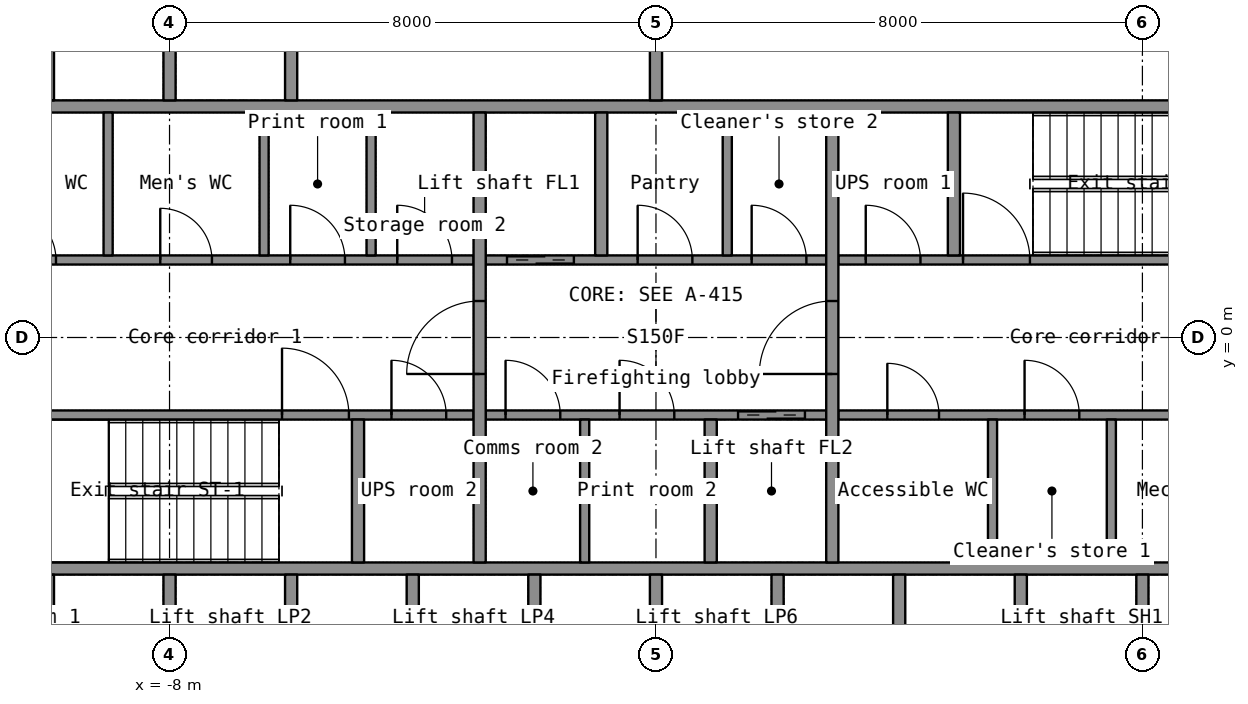
"""IFC4 building model, lengths in metres.
Left out: names, types, materials, properties, quantities, classifications, styles, units other than length and angle.
Written with IfcOpenShell. Run it as: python <this file> out.ifc"""

import sys

from ifc_helpers import new_model, si_unit, direction, frame, frame_2d, origin, place, context, subcontext, project, spatial, rectangle, extrude, element, fill, save


model = new_model("IFC4")
c1 = context("Model", 3, precision=1e-05, world=origin(), true_north=direction((0.0, 1.0)))
c2 = subcontext(c1, "Body", "Model", "MODEL_VIEW")
j1 = project(units=[si_unit("LENGTHUNIT", "METRE"), si_unit("PLANEANGLEUNIT", "RADIAN")], contexts=[c1])
p1 = place(None, origin())
s1 = spatial("IfcSite", under=j1, at=p1, CompositionType="ELEMENT")
p2 = place(p1, origin())
s2 = spatial("IfcBuilding", under=s1, at=p2, CompositionType="ELEMENT")
p3 = place(p2, frame((0.0, 0.0, 97.1)))
s3 = spatial("IfcBuildingStorey", under=s2, at=p3, CompositionType="ELEMENT", Elevation=97.1)
for number, where, z_axis, x_axis in (
    (1, (-11.5, -3.8, 0.0), (0.0, 0.0, 1.0), (1.0, 0.0, 0.0)),
    (2, (-11.5, 3.8, 0.0), (0.0, 0.0, 1.0), (1.0, 0.0, 0.0)),
):
    element("IfcWall", number, at=place(p3, frame(where, z_axis=z_axis, x_axis=x_axis)), inside=s3, PredefinedType="SHEAR", context=c2, shape_type="SweptSolid", body=[
        extrude(rectangle(XDim=23.0, YDim=0.2, at=frame_2d((11.5, 0.0))), origin(), (0.0, 0.0, 1.0), 3.3),
    ])
for number, where, z_axis, x_axis in (
    (3, (-10.0, -6.7, 0.0), (0.0, 0.0, 1.0), (0.0, 1.0, 0.0)),
    (4, (-8.0, -6.7, 0.0), (0.0, 0.0, 1.0), (0.0, 1.0, 0.0)),
    (5, (-6.0, -6.7, 0.0), (0.0, 0.0, 1.0), (0.0, 1.0, 0.0)),
    (6, (-4.0, -6.7, 0.0), (0.0, 0.0, 1.0), (0.0, 1.0, 0.0)),
    (7, (-2.0, -6.7, 0.0), (0.0, 0.0, 1.0), (0.0, 1.0, 0.0)),
    (8, (0.0, -6.7, 0.0), (0.0, 0.0, 1.0), (0.0, 1.0, 0.0)),
    (9, (2.0, -6.7, 0.0), (0.0, 0.0, 1.0), (0.0, 1.0, 0.0)),
    (10, (4.0, -6.7, 0.0), (0.0, 0.0, 1.0), (0.0, 1.0, 0.0)),
    (11, (6.0, -6.7, 0.0), (0.0, 0.0, 1.0), (0.0, 1.0, 0.0)),
    (12, (8.0, -6.7, 0.0), (0.0, 0.0, 1.0), (0.0, 1.0, 0.0)),
    (13, (-10.0, 3.9, 0.0), (0.0, 0.0, 1.0), (0.0, 1.0, 0.0)),
    (14, (-8.0, 3.9, 0.0), (0.0, 0.0, 1.0), (0.0, 1.0, 0.0)),
    (15, (-6.0, 3.9, 0.0), (0.0, 0.0, 1.0), (0.0, 1.0, 0.0)),
):
    element("IfcWall", number, at=place(p3, frame(where, z_axis=z_axis, x_axis=x_axis)), inside=s3, PredefinedType="SHEAR", context=c2, shape_type="SweptSolid", body=[
        extrude(rectangle(XDim=2.8, YDim=0.2, at=frame_2d((1.4, 0.0))), origin(), (0.0, 0.0, 1.0), 3.3),
    ])
p4 = place(p3, frame((0.0, 3.9, 0.0), z_axis=(0.0, 0.0, 1.0), x_axis=(0.0, 1.0, 0.0)))
e16 = element("IfcWall", 16, at=p4, inside=s3, PredefinedType="PARTITIONING", context=c2, shape_type="SweptSolid", body=[
    extrude(rectangle(XDim=2.8, YDim=0.2, at=frame_2d((1.4, 0.0))), origin(), (0.0, 0.0, 1.0), 3.3),
])
p5 = place(p3, frame((-11.5, -1.275, 0.0), z_axis=(0.0, 0.0, 1.0), x_axis=(1.0, 0.0, 0.0)))
e17 = element("IfcWall", 17, at=p5, inside=s3, PredefinedType="SHEAR", context=c2, shape_type="SweptSolid", body=[
    extrude(rectangle(XDim=8.5, YDim=0.15, at=frame_2d((4.25, 0.0))), origin(), (0.0, 0.0, 1.0), 3.3),
])
p6 = place(p5, frame((5.35, 0.0, 0.0)))
e18 = element("IfcOpeningElement", 18, at=p6, cuts=e17, PredefinedType="OPENING", context=c2, shape_type="SweptSolid", body=[
    extrude(rectangle(XDim=1.1, YDim=2.15, at=frame_2d((0.55, 1.075))), frame((0.0, 0.085, 0.0), z_axis=(0.0, -1.0, 0.0), x_axis=(1.0, 0.0, 0.0)), (0.0, 0.0, 1.0), 0.17),
])
p7 = place(p5, frame((7.15, 0.0, 0.0)))
e19 = element("IfcOpeningElement", 19, at=p7, cuts=e17, PredefinedType="OPENING", context=c2, shape_type="SweptSolid", body=[
    extrude(rectangle(XDim=0.9, YDim=2.1, at=frame_2d((0.45, 1.05))), frame((0.0, 0.085, 0.0), z_axis=(0.0, -1.0, 0.0), x_axis=(1.0, 0.0, 0.0)), (0.0, 0.0, 1.0), 0.17),
])
p8 = place(p3, frame((-2.8, -1.275, 0.0), z_axis=(0.0, 0.0, 1.0), x_axis=(1.0, 0.0, 0.0)))
e20 = element("IfcWall", 20, at=p8, inside=s3, PredefinedType="SHEAR", context=c2, shape_type="SweptSolid", body=[
    extrude(rectangle(XDim=5.6, YDim=0.15, at=frame_2d((2.8, 0.0))), origin(), (0.0, 0.0, 1.0), 3.3),
])
p9 = place(p8, frame((4.15, 0.0, 0.0)))
e21 = element("IfcOpeningElement", 21, at=p9, cuts=e20, PredefinedType="OPENING", context=c2, shape_type="SweptSolid", body=[
    extrude(rectangle(XDim=1.1, YDim=2.2, at=frame_2d((0.55, 1.1))), frame((0.0, 0.085, 0.0), z_axis=(0.0, -1.0, 0.0), x_axis=(1.0, 0.0, 0.0)), (0.0, 0.0, 1.0), 0.17),
])
p10 = place(p8, frame((0.326, 0.0, 0.0)))
e22 = element("IfcOpeningElement", 22, at=p10, cuts=e20, PredefinedType="OPENING", context=c2, shape_type="SweptSolid", body=[
    extrude(rectangle(XDim=0.9, YDim=2.1, at=frame_2d((0.45, 1.05))), frame((0.0, 0.085, 0.0), z_axis=(0.0, -1.0, 0.0), x_axis=(1.0, 0.0, 0.0)), (0.0, 0.0, 1.0), 0.17),
])
p11 = place(p8, frame((2.201, 0.0, 0.0)))
e23 = element("IfcOpeningElement", 23, at=p11, cuts=e20, PredefinedType="OPENING", context=c2, shape_type="SweptSolid", body=[
    extrude(rectangle(XDim=0.9, YDim=2.1, at=frame_2d((0.45, 1.05))), frame((0.0, 0.085, 0.0), z_axis=(0.0, -1.0, 0.0), x_axis=(1.0, 0.0, 0.0)), (0.0, 0.0, 1.0), 0.17),
])
p12 = place(p3, frame((3.0, -1.275, 0.0), z_axis=(0.0, 0.0, 1.0), x_axis=(1.0, 0.0, 0.0)))
e24 = element("IfcWall", 24, at=p12, inside=s3, PredefinedType="PARTITIONING", context=c2, shape_type="SweptSolid", body=[
    extrude(rectangle(XDim=8.5, YDim=0.15, at=frame_2d((4.25, 0.0))), origin(), (0.0, 0.0, 1.0), 3.3),
])
p13 = place(p12, frame((0.805, 0.0, 0.0)))
e25 = element("IfcOpeningElement", 25, at=p13, cuts=e24, PredefinedType="OPENING", context=c2, shape_type="SweptSolid", body=[
    extrude(rectangle(XDim=0.85, YDim=2.1, at=frame_2d((0.425, 1.05))), frame((0.0, 0.085, 0.0), z_axis=(0.0, -1.0, 0.0), x_axis=(1.0, 0.0, 0.0)), (0.0, 0.0, 1.0), 0.17),
])
p14 = place(p12, frame((3.062, 0.0, 0.0)))
e26 = element("IfcOpeningElement", 26, at=p14, cuts=e24, PredefinedType="OPENING", context=c2, shape_type="SweptSolid", body=[
    extrude(rectangle(XDim=0.9, YDim=2.1, at=frame_2d((0.45, 1.05))), frame((0.0, 0.085, 0.0), z_axis=(0.0, -1.0, 0.0), x_axis=(1.0, 0.0, 0.0)), (0.0, 0.0, 1.0), 0.17),
])
p15 = place(p12, frame((6.082, 0.0, 0.0)))
e27 = element("IfcOpeningElement", 27, at=p15, cuts=e24, PredefinedType="OPENING", context=c2, shape_type="SweptSolid", body=[
    extrude(rectangle(XDim=0.9, YDim=2.1, at=frame_2d((0.45, 1.05))), frame((0.0, 0.085, 0.0), z_axis=(0.0, -1.0, 0.0), x_axis=(1.0, 0.0, 0.0)), (0.0, 0.0, 1.0), 0.17),
])
p16 = place(p3, frame((-11.5, 1.275, 0.0), z_axis=(0.0, 0.0, 1.0), x_axis=(1.0, 0.0, 0.0)))
e28 = element("IfcWall", 28, at=p16, inside=s3, PredefinedType="PARTITIONING", context=c2, shape_type="SweptSolid", body=[
    extrude(rectangle(XDim=8.5, YDim=0.15, at=frame_2d((4.25, 0.0))), origin(), (0.0, 0.0, 1.0), 3.3),
])
p17 = place(p16, frame((0.782, 0.0, 0.0)))
e29 = element("IfcOpeningElement", 29, at=p17, cuts=e28, PredefinedType="OPENING", context=c2, shape_type="SweptSolid", body=[
    extrude(rectangle(XDim=0.85, YDim=2.1, at=frame_2d((0.425, 1.05))), frame((0.0, 0.085, 0.0), z_axis=(0.0, -1.0, 0.0), x_axis=(1.0, 0.0, 0.0)), (0.0, 0.0, 1.0), 0.17),
])
p18 = place(p16, frame((3.347, 0.0, 0.0)))
e30 = element("IfcOpeningElement", 30, at=p18, cuts=e28, PredefinedType="OPENING", context=c2, shape_type="SweptSolid", body=[
    extrude(rectangle(XDim=0.85, YDim=2.1, at=frame_2d((0.425, 1.05))), frame((0.0, 0.085, 0.0), z_axis=(0.0, -1.0, 0.0), x_axis=(1.0, 0.0, 0.0)), (0.0, 0.0, 1.0), 0.17),
])
p19 = place(p16, frame((5.485, 0.0, 0.0)))
e31 = element("IfcOpeningElement", 31, at=p19, cuts=e28, PredefinedType="OPENING", context=c2, shape_type="SweptSolid", body=[
    extrude(rectangle(XDim=0.9, YDim=2.1, at=frame_2d((0.45, 1.05))), frame((0.0, 0.085, 0.0), z_axis=(0.0, -1.0, 0.0), x_axis=(1.0, 0.0, 0.0)), (0.0, 0.0, 1.0), 0.17),
])
p20 = place(p16, frame((7.245, 0.0, 0.0)))
e32 = element("IfcOpeningElement", 32, at=p20, cuts=e28, PredefinedType="OPENING", context=c2, shape_type="SweptSolid", body=[
    extrude(rectangle(XDim=0.9, YDim=2.1, at=frame_2d((0.45, 1.05))), frame((0.0, 0.085, 0.0), z_axis=(0.0, -1.0, 0.0), x_axis=(1.0, 0.0, 0.0)), (0.0, 0.0, 1.0), 0.17),
])
p21 = place(p3, frame((-2.8, 1.275, 0.0), z_axis=(0.0, 0.0, 1.0), x_axis=(1.0, 0.0, 0.0)))
e33 = element("IfcWall", 33, at=p21, inside=s3, PredefinedType="SHEAR", context=c2, shape_type="SweptSolid", body=[
    extrude(rectangle(XDim=5.6, YDim=0.15, at=frame_2d((2.8, 0.0))), origin(), (0.0, 0.0, 1.0), 3.3),
])
p22 = place(p21, frame((0.35, 0.0, 0.0)))
e34 = element("IfcOpeningElement", 34, at=p22, cuts=e33, PredefinedType="OPENING", context=c2, shape_type="SweptSolid", body=[
    extrude(rectangle(XDim=1.1, YDim=2.2, at=frame_2d((0.55, 1.1))), frame((0.0, 0.085, 0.0), z_axis=(0.0, -1.0, 0.0), x_axis=(1.0, 0.0, 0.0)), (0.0, 0.0, 1.0), 0.17),
])
p23 = place(p21, frame((2.499, 0.0, 0.0)))
e35 = element("IfcOpeningElement", 35, at=p23, cuts=e33, PredefinedType="OPENING", context=c2, shape_type="SweptSolid", body=[
    extrude(rectangle(XDim=0.9, YDim=2.1, at=frame_2d((0.45, 1.05))), frame((0.0, 0.085, 0.0), z_axis=(0.0, -1.0, 0.0), x_axis=(1.0, 0.0, 0.0)), (0.0, 0.0, 1.0), 0.17),
])
p24 = place(p21, frame((4.374, 0.0, 0.0)))
e36 = element("IfcOpeningElement", 36, at=p24, cuts=e33, PredefinedType="OPENING", context=c2, shape_type="SweptSolid", body=[
    extrude(rectangle(XDim=0.9, YDim=2.1, at=frame_2d((0.45, 1.05))), frame((0.0, 0.085, 0.0), z_axis=(0.0, -1.0, 0.0), x_axis=(1.0, 0.0, 0.0)), (0.0, 0.0, 1.0), 0.17),
])
p25 = place(p3, frame((3.0, 1.275, 0.0), z_axis=(0.0, 0.0, 1.0), x_axis=(1.0, 0.0, 0.0)))
e37 = element("IfcWall", 37, at=p25, inside=s3, PredefinedType="SHEAR", context=c2, shape_type="SweptSolid", body=[
    extrude(rectangle(XDim=8.5, YDim=0.15, at=frame_2d((4.25, 0.0))), origin(), (0.0, 0.0, 1.0), 3.3),
])
p26 = place(p25, frame((2.05, 0.0, 0.0)))
e38 = element("IfcOpeningElement", 38, at=p26, cuts=e37, PredefinedType="OPENING", context=c2, shape_type="SweptSolid", body=[
    extrude(rectangle(XDim=1.1, YDim=2.15, at=frame_2d((0.55, 1.075))), frame((0.0, 0.085, 0.0), z_axis=(0.0, -1.0, 0.0), x_axis=(1.0, 0.0, 0.0)), (0.0, 0.0, 1.0), 0.17),
])
p27 = place(p25, frame((0.45, 0.0, 0.0)))
e39 = element("IfcOpeningElement", 39, at=p27, cuts=e37, PredefinedType="OPENING", context=c2, shape_type="SweptSolid", body=[
    extrude(rectangle(XDim=0.9, YDim=2.1, at=frame_2d((0.45, 1.05))), frame((0.0, 0.085, 0.0), z_axis=(0.0, -1.0, 0.0), x_axis=(1.0, 0.0, 0.0)), (0.0, 0.0, 1.0), 0.17),
])
p28 = place(p3, frame((-2.9, -3.7, 0.0), z_axis=(0.0, 0.0, 1.0), x_axis=(0.0, 1.0, 0.0)))
e40 = element("IfcWall", 40, at=p28, inside=s3, PredefinedType="SHEAR", context=c2, shape_type="SweptSolid", body=[
    extrude(rectangle(XDim=7.4, YDim=0.2, at=frame_2d((3.7, 0.0))), origin(), (0.0, 0.0, 1.0), 3.3),
])
p29 = place(p28, frame((3.1, 0.0, 0.0)))
e41 = element("IfcOpeningElement", 41, at=p29, cuts=e40, PredefinedType="OPENING", context=c2, shape_type="SweptSolid", body=[
    extrude(rectangle(XDim=1.2, YDim=2.2, at=frame_2d((0.6, 1.1))), frame((0.0, 0.11, 0.0), z_axis=(0.0, -1.0, 0.0), x_axis=(1.0, 0.0, 0.0)), (0.0, 0.0, 1.0), 0.22),
])
p30 = place(p3, frame((2.9, -3.7, 0.0), z_axis=(0.0, 0.0, 1.0), x_axis=(0.0, 1.0, 0.0)))
e42 = element("IfcWall", 42, at=p30, inside=s3, PredefinedType="SHEAR", context=c2, shape_type="SweptSolid", body=[
    extrude(rectangle(XDim=7.4, YDim=0.2, at=frame_2d((3.7, 0.0))), origin(), (0.0, 0.0, 1.0), 3.3),
])
p31 = place(p30, frame((3.1, 0.0, 0.0)))
e43 = element("IfcOpeningElement", 43, at=p31, cuts=e42, PredefinedType="OPENING", context=c2, shape_type="SweptSolid", body=[
    extrude(rectangle(XDim=1.2, YDim=2.2, at=frame_2d((0.6, 1.1))), frame((0.0, 0.11, 0.0), z_axis=(0.0, -1.0, 0.0), x_axis=(1.0, 0.0, 0.0)), (0.0, 0.0, 1.0), 0.22),
])
for number, where, z_axis, x_axis in (
    (44, (-0.9, 1.35, 0.0), (0.0, 0.0, 1.0), (0.0, 1.0, 0.0)),
    (45, (0.9, -3.7, 0.0), (0.0, 0.0, 1.0), (0.0, 1.0, 0.0)),
    (46, (-4.9, -3.7, 0.0), (0.0, 0.0, 1.0), (0.0, 1.0, 0.0)),
    (47, (4.9, 1.35, 0.0), (0.0, 0.0, 1.0), (0.0, 1.0, 0.0)),
):
    element("IfcWall", number, at=place(p3, frame(where, z_axis=z_axis, x_axis=x_axis)), inside=s3, PredefinedType="SHEAR", context=c2, shape_type="SweptSolid", body=[
        extrude(rectangle(XDim=2.35, YDim=0.2, at=frame_2d((1.175, 0.0))), origin(), (0.0, 0.0, 1.0), 3.3),
    ])
for number, where, z_axis, x_axis in (
    (48, (-9.01, 1.35, 0.0), (0.0, 0.0, 1.0), (0.0, 1.0, 0.0)),
    (49, (-6.445, 1.35, 0.0), (0.0, 0.0, 1.0), (0.0, 1.0, 0.0)),
    (50, (-4.685, 1.35, 0.0), (0.0, 0.0, 1.0), (0.0, 1.0, 0.0)),
    (51, (5.535, -3.7, 0.0), (0.0, 0.0, 1.0), (0.0, 1.0, 0.0)),
    (52, (7.489, -3.7, 0.0), (0.0, 0.0, 1.0), (0.0, 1.0, 0.0)),
    (53, (1.173, 1.35, 0.0), (0.0, 0.0, 1.0), (0.0, 1.0, 0.0)),
    (54, (-1.173, -3.7, 0.0), (0.0, 0.0, 1.0), (0.0, 1.0, 0.0)),
):
    element("IfcWall", number, at=place(p3, frame(where, z_axis=z_axis, x_axis=x_axis)), inside=s3, PredefinedType="PARTITIONING", context=c2, shape_type="SweptSolid", body=[
        extrude(rectangle(XDim=2.35, YDim=0.15, at=frame_2d((1.175, 0.0))), origin(), (0.0, 0.0, 1.0), 3.3),
    ])
p32 = place(p29, origin())
e55 = element("IfcDoor", 55, at=p32, inside=s3, OperationType="SINGLE_SWING_LEFT", PredefinedType="DOOR", context=c2, shape_type="SweptSolid", body=[
    extrude(rectangle(XDim=1.2, YDim=2.2, at=frame_2d((0.6, 1.1))), frame((0.0, 0.025, 0.0), z_axis=(0.0, -1.0, 0.0), x_axis=(1.0, 0.0, 0.0)), (0.0, 0.0, 1.0), 0.05),
])
fill(e41, e55)
p33 = place(p31, origin())
e56 = element("IfcDoor", 56, at=p33, inside=s3, OperationType="SINGLE_SWING_LEFT", PredefinedType="DOOR", context=c2, shape_type="SweptSolid", body=[
    extrude(rectangle(XDim=1.2, YDim=2.2, at=frame_2d((0.6, 1.1))), frame((0.0, 0.025, 0.0), z_axis=(0.0, -1.0, 0.0), x_axis=(1.0, 0.0, 0.0)), (0.0, 0.0, 1.0), 0.05),
])
fill(e43, e56)
p34 = place(p22, origin())
e57 = element("IfcDoor", 57, at=p34, inside=s3, OperationType="DOUBLE_DOOR_SLIDING", PredefinedType="DOOR", context=c2, shape_type="SweptSolid", body=[
    extrude(rectangle(XDim=1.1, YDim=2.2, at=frame_2d((0.55, 1.1))), frame((0.0, 0.025, 0.0), z_axis=(0.0, -1.0, 0.0), x_axis=(1.0, 0.0, 0.0)), (0.0, 0.0, 1.0), 0.05),
])
fill(e34, e57)
p35 = place(p9, origin())
e58 = element("IfcDoor", 58, at=p35, inside=s3, OperationType="DOUBLE_DOOR_SLIDING", PredefinedType="DOOR", context=c2, shape_type="SweptSolid", body=[
    extrude(rectangle(XDim=1.1, YDim=2.2, at=frame_2d((0.55, 1.1))), frame((0.0, 0.025, 0.0), z_axis=(0.0, -1.0, 0.0), x_axis=(1.0, 0.0, 0.0)), (0.0, 0.0, 1.0), 0.05),
])
fill(e21, e58)
p36 = place(p6, origin())
e59 = element("IfcDoor", 59, at=p36, inside=s3, OperationType="SINGLE_SWING_LEFT", PredefinedType="DOOR", context=c2, shape_type="SweptSolid", body=[
    extrude(rectangle(XDim=1.1, YDim=2.15, at=frame_2d((0.55, 1.075))), frame((0.0, 0.025, 0.0), z_axis=(0.0, -1.0, 0.0), x_axis=(1.0, 0.0, 0.0)), (0.0, 0.0, 1.0), 0.05),
])
fill(e18, e59)
p37 = place(p26, origin())
e60 = element("IfcDoor", 60, at=p37, inside=s3, OperationType="SINGLE_SWING_LEFT", PredefinedType="DOOR", context=c2, shape_type="SweptSolid", body=[
    extrude(rectangle(XDim=1.1, YDim=2.15, at=frame_2d((0.55, 1.075))), frame((0.0, 0.025, 0.0), z_axis=(0.0, -1.0, 0.0), x_axis=(1.0, 0.0, 0.0)), (0.0, 0.0, 1.0), 0.05),
])
fill(e38, e60)
p38 = place(p17, origin())
e61 = element("IfcDoor", 61, at=p38, inside=s3, OperationType="SINGLE_SWING_LEFT", PredefinedType="DOOR", context=c2, shape_type="SweptSolid", body=[
    extrude(rectangle(XDim=0.85, YDim=2.1, at=frame_2d((0.425, 1.05))), frame((0.0, 0.025, 0.0), z_axis=(0.0, -1.0, 0.0), x_axis=(1.0, 0.0, 0.0)), (0.0, 0.0, 1.0), 0.05),
])
fill(e29, e61)
p39 = place(p18, origin())
e62 = element("IfcDoor", 62, at=p39, inside=s3, OperationType="SINGLE_SWING_LEFT", PredefinedType="DOOR", context=c2, shape_type="SweptSolid", body=[
    extrude(rectangle(XDim=0.85, YDim=2.1, at=frame_2d((0.425, 1.05))), frame((0.0, 0.025, 0.0), z_axis=(0.0, -1.0, 0.0), x_axis=(1.0, 0.0, 0.0)), (0.0, 0.0, 1.0), 0.05),
])
fill(e30, e62)
p40 = place(p19, origin())
e63 = element("IfcDoor", 63, at=p40, inside=s3, OperationType="SINGLE_SWING_LEFT", PredefinedType="DOOR", context=c2, shape_type="SweptSolid", body=[
    extrude(rectangle(XDim=0.9, YDim=2.1, at=frame_2d((0.45, 1.05))), frame((0.0, 0.025, 0.0), z_axis=(0.0, -1.0, 0.0), x_axis=(1.0, 0.0, 0.0)), (0.0, 0.0, 1.0), 0.05),
])
fill(e31, e63)
p41 = place(p20, origin())
e64 = element("IfcDoor", 64, at=p41, inside=s3, OperationType="SINGLE_SWING_LEFT", PredefinedType="DOOR", context=c2, shape_type="SweptSolid", body=[
    extrude(rectangle(XDim=0.9, YDim=2.1, at=frame_2d((0.45, 1.05))), frame((0.0, 0.025, 0.0), z_axis=(0.0, -1.0, 0.0), x_axis=(1.0, 0.0, 0.0)), (0.0, 0.0, 1.0), 0.05),
])
fill(e32, e64)
p42 = place(p13, origin())
e65 = element("IfcDoor", 65, at=p42, inside=s3, OperationType="SINGLE_SWING_LEFT", PredefinedType="DOOR", context=c2, shape_type="SweptSolid", body=[
    extrude(rectangle(XDim=0.85, YDim=2.1, at=frame_2d((0.425, 1.05))), frame((0.0, 0.025, 0.0), z_axis=(0.0, -1.0, 0.0), x_axis=(1.0, 0.0, 0.0)), (0.0, 0.0, 1.0), 0.05),
])
fill(e25, e65)
p43 = place(p14, origin())
e66 = element("IfcDoor", 66, at=p43, inside=s3, OperationType="SINGLE_SWING_LEFT", PredefinedType="DOOR", context=c2, shape_type="SweptSolid", body=[
    extrude(rectangle(XDim=0.9, YDim=2.1, at=frame_2d((0.45, 1.05))), frame((0.0, 0.025, 0.0), z_axis=(0.0, -1.0, 0.0), x_axis=(1.0, 0.0, 0.0)), (0.0, 0.0, 1.0), 0.05),
])
fill(e26, e66)
p44 = place(p23, origin())
e67 = element("IfcDoor", 67, at=p44, inside=s3, OperationType="SINGLE_SWING_LEFT", PredefinedType="DOOR", context=c2, shape_type="SweptSolid", body=[
    extrude(rectangle(XDim=0.9, YDim=2.1, at=frame_2d((0.45, 1.05))), frame((0.0, 0.025, 0.0), z_axis=(0.0, -1.0, 0.0), x_axis=(1.0, 0.0, 0.0)), (0.0, 0.0, 1.0), 0.05),
])
fill(e35, e67)
p45 = place(p24, origin())
e68 = element("IfcDoor", 68, at=p45, inside=s3, OperationType="SINGLE_SWING_LEFT", PredefinedType="DOOR", context=c2, shape_type="SweptSolid", body=[
    extrude(rectangle(XDim=0.9, YDim=2.1, at=frame_2d((0.45, 1.05))), frame((0.0, 0.025, 0.0), z_axis=(0.0, -1.0, 0.0), x_axis=(1.0, 0.0, 0.0)), (0.0, 0.0, 1.0), 0.05),
])
fill(e36, e68)
p46 = place(p10, origin())
e69 = element("IfcDoor", 69, at=p46, inside=s3, OperationType="SINGLE_SWING_LEFT", PredefinedType="DOOR", context=c2, shape_type="SweptSolid", body=[
    extrude(rectangle(XDim=0.9, YDim=2.1, at=frame_2d((0.45, 1.05))), frame((0.0, 0.025, 0.0), z_axis=(0.0, -1.0, 0.0), x_axis=(1.0, 0.0, 0.0)), (0.0, 0.0, 1.0), 0.05),
])
fill(e22, e69)
p47 = place(p11, origin())
e70 = element("IfcDoor", 70, at=p47, inside=s3, OperationType="SINGLE_SWING_LEFT", PredefinedType="DOOR", context=c2, shape_type="SweptSolid", body=[
    extrude(rectangle(XDim=0.9, YDim=2.1, at=frame_2d((0.45, 1.05))), frame((0.0, 0.025, 0.0), z_axis=(0.0, -1.0, 0.0), x_axis=(1.0, 0.0, 0.0)), (0.0, 0.0, 1.0), 0.05),
])
fill(e23, e70)
p48 = place(p27, origin())
e71 = element("IfcDoor", 71, at=p48, inside=s3, OperationType="SINGLE_SWING_LEFT", PredefinedType="DOOR", context=c2, shape_type="SweptSolid", body=[
    extrude(rectangle(XDim=0.9, YDim=2.1, at=frame_2d((0.45, 1.05))), frame((0.0, 0.025, 0.0), z_axis=(0.0, -1.0, 0.0), x_axis=(1.0, 0.0, 0.0)), (0.0, 0.0, 1.0), 0.05),
])
fill(e39, e71)
p49 = place(p7, origin())
e72 = element("IfcDoor", 72, at=p49, inside=s3, OperationType="SINGLE_SWING_LEFT", PredefinedType="DOOR", context=c2, shape_type="SweptSolid", body=[
    extrude(rectangle(XDim=0.9, YDim=2.1, at=frame_2d((0.45, 1.05))), frame((0.0, 0.025, 0.0), z_axis=(0.0, -1.0, 0.0), x_axis=(1.0, 0.0, 0.0)), (0.0, 0.0, 1.0), 0.05),
])
fill(e19, e72)
save(model, sys.argv[1])
